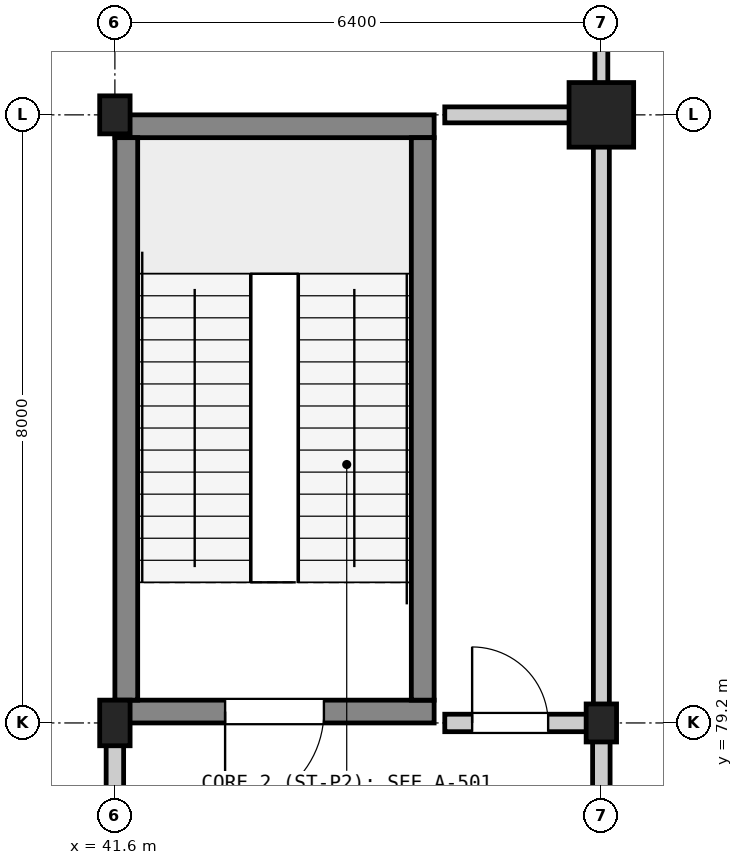
"""IFC4 building model, lengths in metres.
Left out: names, types, materials, properties, quantities, classifications, styles, units other than length and angle.
Written with IfcOpenShell. Run it as: python <this file> out.ifc"""

import sys

from ifc_helpers import new_model, si_unit, direction, frame, frame_2d, origin, origin_2d, place, context, subcontext, project, spatial, rectangle, extrude, element, fill, save


model = new_model("IFC4")
c1 = context("Model", 3, precision=1e-05, world=origin(), true_north=direction((0.0, 1.0)))
c2 = subcontext(c1, "Body", "Model", "MODEL_VIEW")
j1 = project(units=[si_unit("LENGTHUNIT", "METRE"), si_unit("PLANEANGLEUNIT", "RADIAN")], contexts=[c1])
p1 = place(None, origin())
s1 = spatial("IfcSite", under=j1, at=p1, CompositionType="ELEMENT")
p2 = place(p1, origin())
s2 = spatial("IfcBuilding", under=s1, at=p2, CompositionType="ELEMENT")
p3 = place(p2, origin())
s3 = spatial("IfcBuildingStorey", under=s2, at=p3, CompositionType="ELEMENT", Elevation=0.0)
p4 = place(p3, frame((41.6, 79.2, 0.0), z_axis=(0.0, 0.0, 1.0), x_axis=(1.0, 0.0, 0.0)))
e1 = element("IfcColumn", 1, at=p4, inside=s3, PredefinedType="COLUMN", context=c2, shape_type="SweptSolid", body=[
    extrude(rectangle(XDim=0.4, YDim=0.6, at=origin_2d()), origin(), (0.0, 0.0, 1.0), 5.4),
])
for number, where, z_axis, x_axis in (
    (2, (41.6, 87.2, 0.0), (0.0, 0.0, 1.0), (1.0, 0.0, 0.0)),
    (3, (48.0, 79.2, 0.0), (0.0, 0.0, 1.0), (1.0, 0.0, 0.0)),
):
    element("IfcColumn", number, at=place(p3, frame(where, z_axis=z_axis, x_axis=x_axis)), inside=s3, PredefinedType="COLUMN", context=c2, shape_type="SweptSolid", body=[
        extrude(rectangle(XDim=0.4, YDim=0.5, at=origin_2d()), origin(), (0.0, 0.0, 1.0), 5.4),
    ])
p5 = place(p3, frame((48.0, 87.2, 0.0), z_axis=(0.0, 0.0, 1.0), x_axis=(1.0, 0.0, 0.0)))
e4 = element("IfcColumn", 4, at=p5, inside=s3, PredefinedType="COLUMN", context=c2, shape_type="SweptSolid", body=[
    extrude(rectangle(XDim=0.85, YDim=0.85, at=origin_2d()), origin(), (0.0, 0.0, 1.0), 5.4),
])
p6 = place(p3, frame((41.6, 79.35, 0.0), z_axis=(0.0, 0.0, 1.0), x_axis=(1.0, 0.0, 0.0)))
e5 = element("IfcWall", 5, at=p6, inside=s3, PredefinedType="SHEAR", context=c2, shape_type="SweptSolid", body=[
    extrude(rectangle(XDim=4.2, YDim=0.3, at=frame_2d((2.1, 0.0))), origin(), (0.0, 0.0, 1.0), 5.08),
])
p7 = place(p6, frame((1.45, 0.0, 0.0)))
e6 = element("IfcOpeningElement", 6, at=p7, cuts=e5, PredefinedType="OPENING", context=c2, shape_type="SweptSolid", body=[
    extrude(rectangle(XDim=1.3, YDim=2.18, at=frame_2d((0.65, 1.09))), frame((0.0, 0.162, 0.0), z_axis=(0.0, -1.0, 0.0), x_axis=(1.0, 0.0, 0.0)), (0.0, 0.0, 1.0), 0.324),
])
p8 = place(p3, frame((41.6, 87.05, 0.0), z_axis=(0.0, 0.0, 1.0), x_axis=(1.0, 0.0, 0.0)))
e7 = element("IfcWall", 7, at=p8, inside=s3, PredefinedType="SHEAR", context=c2, shape_type="SweptSolid", body=[
    extrude(rectangle(XDim=4.2, YDim=0.3, at=frame_2d((2.1, 0.0))), origin(), (0.0, 0.0, 1.0), 5.08),
])
for number, where, z_axis, x_axis in (
    (8, (41.75, 79.5, 0.0), (0.0, 0.0, 1.0), (0.0, 1.0, 0.0)),
    (9, (45.65, 79.5, 0.0), (0.0, 0.0, 1.0), (0.0, 1.0, 0.0)),
):
    element("IfcWall", number, at=place(p3, frame(where, z_axis=z_axis, x_axis=x_axis)), inside=s3, PredefinedType="SHEAR", context=c2, shape_type="SweptSolid", body=[
        extrude(rectangle(XDim=7.4, YDim=0.3, at=frame_2d((3.7, 0.0))), origin(), (0.0, 0.0, 1.0), 5.08),
    ])
p9 = place(p3, frame((45.94, 79.2, 0.0), z_axis=(0.0, 0.0, 1.0), x_axis=(1.0, 0.0, 0.0)))
e10 = element("IfcWall", 10, at=p9, inside=s3, PredefinedType="SOLIDWALL", context=c2, shape_type="SweptSolid", body=[
    extrude(rectangle(XDim=1.92, YDim=0.23, at=frame_2d((0.96, 0.0))), origin(), (0.0, 0.0, 1.0), 4.475),
])
p10 = place(p9, frame((0.36, 0.0, 0.0)))
e11 = element("IfcOpeningElement", 11, at=p10, cuts=e10, PredefinedType="OPENING", context=c2, shape_type="SweptSolid", body=[
    extrude(rectangle(XDim=1.0, YDim=2.15, at=frame_2d((0.5, 1.075))), frame((0.0, 0.127, 0.0), z_axis=(0.0, -1.0, 0.0), x_axis=(1.0, 0.0, 0.0)), (0.0, 0.0, 1.0), 0.254),
])
p11 = place(p3, frame((41.6, 75.54, 0.0), z_axis=(0.0, 0.0, 1.0), x_axis=(0.0, 1.0, 0.0)))
e12 = element("IfcWall", 12, at=p11, inside=s3, PredefinedType="SOLIDWALL", context=c2, shape_type="SweptSolid", body=[
    extrude(rectangle(XDim=3.52, YDim=0.23, at=frame_2d((1.76, 0.0))), origin(), (0.0, 0.0, 1.0), 4.575),
])
p12 = place(p11, frame((1.06, 0.0, 0.0)))
e13 = element("IfcOpeningElement", 13, at=p12, cuts=e12, PredefinedType="OPENING", context=c2, shape_type="SweptSolid", body=[
    extrude(rectangle(XDim=1.4, YDim=2.2, at=frame_2d((0.7, 1.1))), frame((0.0, 0.127, 0.0), z_axis=(0.0, -1.0, 0.0), x_axis=(1.0, 0.0, 0.0)), (0.0, 0.0, 1.0), 0.254),
])
p13 = place(p3, frame((48.0, 75.54, 0.0), z_axis=(0.0, 0.0, 1.0), x_axis=(0.0, 1.0, 0.0)))
e14 = element("IfcWall", 14, at=p13, inside=s3, PredefinedType="SOLIDWALL", context=c2, shape_type="SweptSolid", body=[
    extrude(rectangle(XDim=3.52, YDim=0.23, at=frame_2d((1.76, 0.0))), origin(), (0.0, 0.0, 1.0), 4.625),
])
p14 = place(p3, frame((45.94, 87.2, 0.0), z_axis=(0.0, 0.0, 1.0), x_axis=(1.0, 0.0, 0.0)))
e15 = element("IfcWall", 15, at=p14, inside=s3, PredefinedType="SOLIDWALL", context=c2, shape_type="SweptSolid", body=[
    extrude(rectangle(XDim=1.92, YDim=0.21, at=frame_2d((0.96, 0.0))), origin(), (0.0, 0.0, 1.0), 4.575),
])
p15 = place(p3, frame((48.0, 79.34, 0.0), z_axis=(0.0, 0.0, 1.0), x_axis=(0.0, 1.0, 0.0)))
e16 = element("IfcWall", 16, at=p15, inside=s3, PredefinedType="SOLIDWALL", context=c2, shape_type="SweptSolid", body=[
    extrude(rectangle(XDim=7.72, YDim=0.21, at=frame_2d((3.86, 0.0))), origin(), (0.0, 0.0, 1.0), 4.325),
])
p16 = place(p3, frame((48.0, 87.2, 0.0), z_axis=(0.0, 0.0, 1.0), x_axis=(0.0, 1.0, 0.0)))
e17 = element("IfcWall", 17, at=p16, inside=s3, PredefinedType="PARTITIONING", context=c2, shape_type="SweptSolid", body=[
    extrude(rectangle(XDim=7.895, YDim=0.17, at=frame_2d((3.948, 0.0))), origin(), (0.0, 0.0, 1.0), 4.375),
])
p17 = place(p7, frame((1.3, 0.0, 0.0), z_axis=(0.0, 0.0, 1.0), x_axis=(-1.0, 0.0, 0.0)))
e18 = element("IfcDoor", 18, at=p17, inside=s3, OperationType="SINGLE_SWING_RIGHT", PredefinedType="DOOR", context=c2, shape_type="SweptSolid", body=[
    extrude(rectangle(XDim=1.3, YDim=2.18, at=frame_2d((0.65, 1.09))), frame((0.0, 0.025, 0.0), z_axis=(0.0, -1.0, 0.0), x_axis=(1.0, 0.0, 0.0)), (0.0, 0.0, 1.0), 0.05),
])
fill(e6, e18)
p18 = place(p10, origin())
e19 = element("IfcDoor", 19, at=p18, inside=s3, OperationType="SINGLE_SWING_LEFT", PredefinedType="DOOR", context=c2, shape_type="SweptSolid", body=[
    extrude(rectangle(XDim=1.0, YDim=2.15, at=frame_2d((0.5, 1.075))), frame((0.0, 0.025, 0.0), z_axis=(0.0, -1.0, 0.0), x_axis=(1.0, 0.0, 0.0)), (0.0, 0.0, 1.0), 0.05),
])
fill(e11, e19)
save(model, sys.argv[1])
